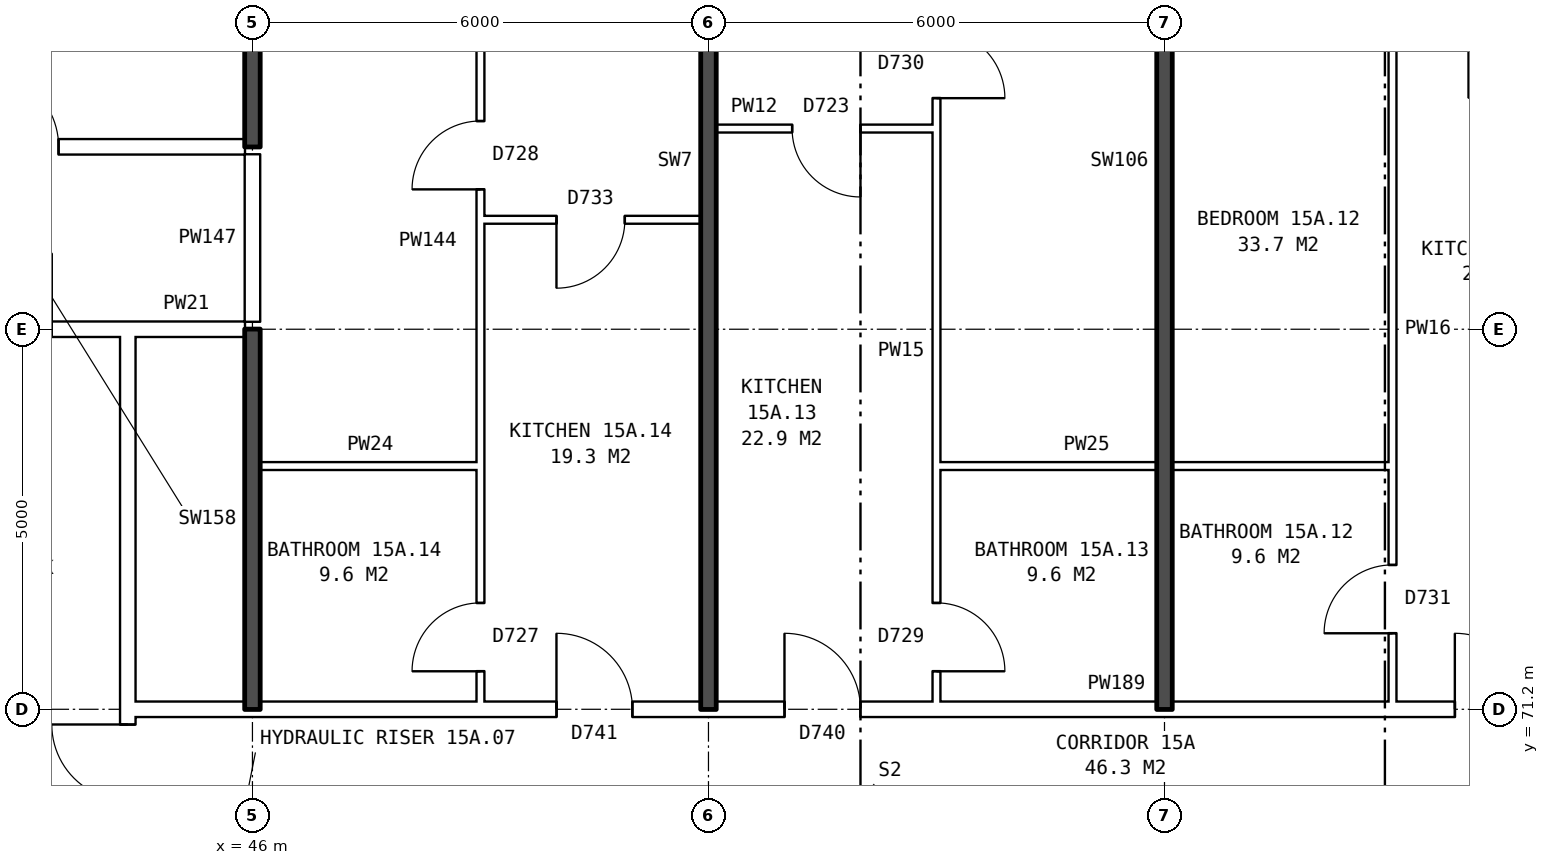
"""IFC4 building model, lengths in metres.
Left out: names, types, materials, properties, quantities, classifications, styles, units other than length and angle.
Written with IfcOpenShell. Run it as: python <this file> out.ifc"""

import sys

from ifc_helpers import new_model, si_unit, direction, frame, frame_2d, origin, place, context, subcontext, project, spatial, rectangle, extrude, element, fill, save


model = new_model("IFC4")
c1 = context("Model", 3, precision=1e-05, world=origin(), true_north=direction((0.0, 1.0)))
c2 = subcontext(c1, "Body", "Model", "MODEL_VIEW")
j1 = project(units=[si_unit("LENGTHUNIT", "METRE"), si_unit("PLANEANGLEUNIT", "RADIAN")], contexts=[c1])
p1 = place(None, origin())
s1 = spatial("IfcSite", under=j1, at=p1, CompositionType="ELEMENT")
p2 = place(p1, origin())
s2 = spatial("IfcBuilding", under=s1, at=p2, CompositionType="ELEMENT")
p3 = place(p2, frame((0.0, 0.0, 56.7)))
s3 = spatial("IfcBuildingStorey", under=s2, at=p3, CompositionType="ELEMENT", Elevation=56.7)
p4 = place(p3, frame((44.36, 63.9, 0.0), z_axis=(0.0, 0.0, 1.0), x_axis=(0.0, 1.0, 0.0)))
e1 = element("IfcWall", 1, at=p4, inside=s3, PredefinedType="PARTITIONING", context=c2, shape_type="SweptSolid", body=[
    extrude(rectangle(XDim=12.2, YDim=0.2, at=frame_2d((6.1, 0.0))), origin(), (0.0, 0.0, 1.0), 2.85),
])
p5 = place(p4, frame((5.1, 0.0, 0.0)))
e2 = element("IfcOpeningElement", 2, at=p5, cuts=e1, PredefinedType="OPENING", context=c2, shape_type="SweptSolid", body=[
    extrude(rectangle(XDim=2.0, YDim=2.1, at=frame_2d((1.0, 1.05))), frame((0.0, 0.11, 0.0), z_axis=(0.0, -1.0, 0.0), x_axis=(1.0, 0.0, 0.0)), (0.0, 0.0, 1.0), 0.22),
])
p6 = place(p3, frame((44.36, 71.2, 0.0), z_axis=(0.0, 0.0, 1.0), x_axis=(1.0, 0.0, 0.0)))
e3 = element("IfcWall", 3, at=p6, inside=s3, PredefinedType="PARTITIONING", context=c2, shape_type="SweptSolid", body=[
    extrude(rectangle(XDim=19.28, YDim=0.2, at=frame_2d((9.64, 0.0))), origin(), (0.0, 0.0, 1.0), 2.85),
])
p7 = place(p6, frame((17.46, 0.0, 0.0)))
e4 = element("IfcOpeningElement", 4, at=p7, cuts=e3, PredefinedType="OPENING", context=c2, shape_type="SweptSolid", body=[
    extrude(rectangle(XDim=1.0, YDim=2.1, at=frame_2d((0.5, 1.05))), frame((0.0, 0.11, 0.0), z_axis=(0.0, -1.0, 0.0), x_axis=(1.0, 0.0, 0.0)), (0.0, 0.0, 1.0), 0.22),
])
p8 = place(p6, frame((8.64, 0.0, 0.0)))
e5 = element("IfcOpeningElement", 5, at=p8, cuts=e3, PredefinedType="OPENING", context=c2, shape_type="SweptSolid", body=[
    extrude(rectangle(XDim=1.0, YDim=2.1, at=frame_2d((0.5, 1.05))), frame((0.0, 0.11, 0.0), z_axis=(0.0, -1.0, 0.0), x_axis=(1.0, 0.0, 0.0)), (0.0, 0.0, 1.0), 0.22),
])
p9 = place(p6, frame((5.64, 0.0, 0.0)))
e6 = element("IfcOpeningElement", 6, at=p9, cuts=e3, PredefinedType="OPENING", context=c2, shape_type="SweptSolid", body=[
    extrude(rectangle(XDim=1.0, YDim=2.1, at=frame_2d((0.5, 1.05))), frame((0.0, 0.11, 0.0), z_axis=(0.0, -1.0, 0.0), x_axis=(1.0, 0.0, 0.0)), (0.0, 0.0, 1.0), 0.22),
])
p10 = place(p3, frame((46.1, 74.4, 0.0), z_axis=(0.0, 0.0, 1.0), x_axis=(1.0, 0.0, 0.0)))
e7 = element("IfcWall", 7, at=p10, inside=s3, PredefinedType="PARTITIONING", context=c2, shape_type="SweptSolid", body=[
    extrude(rectangle(XDim=2.9, YDim=0.1, at=frame_2d((1.45, 0.0))), origin(), (0.0, 0.0, 1.0), 2.85),
])
p11 = place(p3, frame((55.0, 74.4, 0.0), z_axis=(0.0, 0.0, 1.0), x_axis=(1.0, 0.0, 0.0)))
e8 = element("IfcWall", 8, at=p11, inside=s3, PredefinedType="PARTITIONING", context=c2, shape_type="SweptSolid", body=[
    extrude(rectangle(XDim=6.0, YDim=0.1, at=frame_2d((3.0, 0.0))), origin(), (0.0, 0.0, 1.0), 2.85),
])
p12 = place(p3, frame((41.36, 76.2, 0.0), z_axis=(0.0, 0.0, 1.0), x_axis=(1.0, 0.0, 0.0)))
e9 = element("IfcWall", 9, at=p12, inside=s3, PredefinedType="PARTITIONING", context=c2, shape_type="SweptSolid", body=[
    extrude(rectangle(XDim=3.0, YDim=0.2, at=frame_2d((1.5, 0.0))), origin(), (0.0, 0.0, 1.0), 2.85),
])
p13 = place(p12, frame((1.0, 0.0, 0.0)))
e10 = element("IfcOpeningElement", 10, at=p13, cuts=e9, PredefinedType="OPENING", context=c2, shape_type="SweptSolid", body=[
    extrude(rectangle(XDim=1.0, YDim=2.1, at=frame_2d((0.5, 1.05))), frame((0.0, 0.11, 0.0), z_axis=(0.0, -1.0, 0.0), x_axis=(1.0, 0.0, 0.0)), (0.0, 0.0, 1.0), 0.22),
])
p14 = place(p3, frame((44.36, 76.2, 0.0), z_axis=(0.0, 0.0, 1.0), x_axis=(1.0, 0.0, 0.0)))
e11 = element("IfcWall", 11, at=p14, inside=s3, PredefinedType="PARTITIONING", context=c2, shape_type="SweptSolid", body=[
    extrude(rectangle(XDim=1.54, YDim=0.2, at=frame_2d((0.77, 0.0))), origin(), (0.0, 0.0, 1.0), 2.85),
])
p15 = place(p3, frame((49.0, 77.64, 0.0), z_axis=(0.0, 0.0, 1.0), x_axis=(1.0, 0.0, 0.0)))
e12 = element("IfcWall", 12, at=p15, inside=s3, PredefinedType="PARTITIONING", context=c2, shape_type="SweptSolid", body=[
    extrude(rectangle(XDim=2.9, YDim=0.1, at=frame_2d((1.45, 0.0))), origin(), (0.0, 0.0, 1.0), 2.85),
])
p16 = place(p15, frame((1.0, 0.0, 0.0)))
e13 = element("IfcOpeningElement", 13, at=p16, cuts=e12, PredefinedType="OPENING", context=c2, shape_type="SweptSolid", body=[
    extrude(rectangle(XDim=0.9, YDim=2.1, at=frame_2d((0.45, 1.05))), frame((0.0, 0.06, 0.0), z_axis=(0.0, -1.0, 0.0), x_axis=(1.0, 0.0, 0.0)), (0.0, 0.0, 1.0), 0.12),
])
p17 = place(p3, frame((21.86, 78.6, 0.0), z_axis=(0.0, 0.0, 1.0), x_axis=(1.0, 0.0, 0.0)))
e14 = element("IfcWall", 14, at=p17, inside=s3, PredefinedType="PARTITIONING", context=c2, shape_type="SweptSolid", body=[
    extrude(rectangle(XDim=24.04, YDim=0.2, at=frame_2d((12.02, 0.0))), origin(), (0.0, 0.0, 1.0), 2.85),
])
p18 = place(p17, frame((20.59, 0.0, 0.0)))
e15 = element("IfcOpeningElement", 15, at=p18, cuts=e14, PredefinedType="OPENING", context=c2, shape_type="SweptSolid", body=[
    extrude(rectangle(XDim=1.0, YDim=2.1, at=frame_2d((0.5, 1.05))), frame((0.0, 0.11, 0.0), z_axis=(0.0, -1.0, 0.0), x_axis=(1.0, 0.0, 0.0)), (0.0, 0.0, 1.0), 0.22),
])
p19 = place(p17, frame((8.64, 0.0, 0.0)))
e16 = element("IfcOpeningElement", 16, at=p19, cuts=e14, PredefinedType="OPENING", context=c2, shape_type="SweptSolid", body=[
    extrude(rectangle(XDim=1.0, YDim=2.1, at=frame_2d((0.5, 1.05))), frame((0.0, 0.11, 0.0), z_axis=(0.0, -1.0, 0.0), x_axis=(1.0, 0.0, 0.0)), (0.0, 0.0, 1.0), 0.22),
])
p20 = place(p17, frame((3.64, 0.0, 0.0)))
e17 = element("IfcOpeningElement", 17, at=p20, cuts=e14, PredefinedType="OPENING", context=c2, shape_type="SweptSolid", body=[
    extrude(rectangle(XDim=1.0, YDim=2.1, at=frame_2d((0.5, 1.05))), frame((0.0, 0.11, 0.0), z_axis=(0.0, -1.0, 0.0), x_axis=(1.0, 0.0, 0.0)), (0.0, 0.0, 1.0), 0.22),
])
p21 = place(p3, frame((52.1, 78.84, 0.0), z_axis=(0.0, 0.0, 1.0), x_axis=(1.0, 0.0, 0.0)))
e18 = element("IfcWall", 18, at=p21, inside=s3, PredefinedType="PARTITIONING", context=c2, shape_type="SweptSolid", body=[
    extrude(rectangle(XDim=2.9, YDim=0.1, at=frame_2d((1.45, 0.0))), origin(), (0.0, 0.0, 1.0), 2.85),
])
p22 = place(p21, frame((1.0, 0.0, 0.0)))
e19 = element("IfcOpeningElement", 19, at=p22, cuts=e18, PredefinedType="OPENING", context=c2, shape_type="SweptSolid", body=[
    extrude(rectangle(XDim=0.9, YDim=2.1, at=frame_2d((0.45, 1.05))), frame((0.0, 0.06, 0.0), z_axis=(0.0, -1.0, 0.0), x_axis=(1.0, 0.0, 0.0)), (0.0, 0.0, 1.0), 0.12),
])
p23 = place(p3, frame((46.0, 71.2, 0.0), z_axis=(0.0, 0.0, 1.0), x_axis=(0.0, 1.0, 0.0)))
e20 = element("IfcWall", 20, at=p23, inside=s3, PredefinedType="SOLIDWALL", context=c2, shape_type="SweptSolid", body=[
    extrude(rectangle(XDim=5.0, YDim=0.2, at=frame_2d((2.5, 0.0))), origin(), (0.0, 0.0, 1.0), 2.85),
])
p24 = place(p3, frame((46.0, 76.3, 0.0), z_axis=(0.0, 0.0, 1.0), x_axis=(0.0, 1.0, 0.0)))
e21 = element("IfcWall", 21, at=p24, inside=s3, PredefinedType="PARTITIONING", context=c2, shape_type="SweptSolid", body=[
    extrude(rectangle(XDim=2.2, YDim=0.2, at=frame_2d((1.1, 0.0))), origin(), (0.0, 0.0, 1.0), 2.85),
])
p25 = place(p3, frame((46.0, 78.6, 0.0), z_axis=(0.0, 0.0, 1.0), x_axis=(0.0, 1.0, 0.0)))
e22 = element("IfcWall", 22, at=p25, inside=s3, PredefinedType="SOLIDWALL", context=c2, shape_type="SweptSolid", body=[
    extrude(rectangle(XDim=7.04, YDim=0.2, at=frame_2d((3.52, 0.0))), origin(), (0.0, 0.0, 1.0), 2.85),
])
p26 = place(p3, frame((49.0, 71.3, 0.0), z_axis=(0.0, 0.0, 1.0), x_axis=(0.0, 1.0, 0.0)))
e23 = element("IfcWall", 23, at=p26, inside=s3, PredefinedType="PARTITIONING", context=c2, shape_type="SweptSolid", body=[
    extrude(rectangle(XDim=14.34, YDim=0.1, at=frame_2d((7.17, 0.0))), origin(), (0.0, 0.0, 1.0), 2.85),
])
p27 = place(p26, frame((6.74, 0.0, 0.0)))
e24 = element("IfcOpeningElement", 24, at=p27, cuts=e23, PredefinedType="OPENING", context=c2, shape_type="SweptSolid", body=[
    extrude(rectangle(XDim=0.9, YDim=2.1, at=frame_2d((0.45, 1.05))), frame((0.0, 0.06, 0.0), z_axis=(0.0, -1.0, 0.0), x_axis=(1.0, 0.0, 0.0)), (0.0, 0.0, 1.0), 0.12),
])
p28 = place(p26, frame((0.4, 0.0, 0.0)))
e25 = element("IfcOpeningElement", 25, at=p28, cuts=e23, PredefinedType="OPENING", context=c2, shape_type="SweptSolid", body=[
    extrude(rectangle(XDim=0.9, YDim=2.1, at=frame_2d((0.45, 1.05))), frame((0.0, 0.06, 0.0), z_axis=(0.0, -1.0, 0.0), x_axis=(1.0, 0.0, 0.0)), (0.0, 0.0, 1.0), 0.12),
])
p29 = place(p3, frame((52.0, 71.2, 0.0), z_axis=(0.0, 0.0, 1.0), x_axis=(0.0, 1.0, 0.0)))
e26 = element("IfcWall", 26, at=p29, inside=s3, PredefinedType="SOLIDWALL", context=c2, shape_type="SweptSolid", body=[
    extrude(rectangle(XDim=14.44, YDim=0.2, at=frame_2d((7.22, 0.0))), origin(), (0.0, 0.0, 1.0), 2.85),
])
p30 = place(p3, frame((55.0, 71.3, 0.0), z_axis=(0.0, 0.0, 1.0), x_axis=(0.0, 1.0, 0.0)))
e27 = element("IfcWall", 27, at=p30, inside=s3, PredefinedType="PARTITIONING", context=c2, shape_type="SweptSolid", body=[
    extrude(rectangle(XDim=14.34, YDim=0.1, at=frame_2d((7.17, 0.0))), origin(), (0.0, 0.0, 1.0), 2.85),
])
p31 = place(p30, frame((7.94, 0.0, 0.0)))
e28 = element("IfcOpeningElement", 28, at=p31, cuts=e27, PredefinedType="OPENING", context=c2, shape_type="SweptSolid", body=[
    extrude(rectangle(XDim=0.9, YDim=2.1, at=frame_2d((0.45, 1.05))), frame((0.0, 0.06, 0.0), z_axis=(0.0, -1.0, 0.0), x_axis=(1.0, 0.0, 0.0)), (0.0, 0.0, 1.0), 0.12),
])
p32 = place(p30, frame((0.4, 0.0, 0.0)))
e29 = element("IfcOpeningElement", 29, at=p32, cuts=e27, PredefinedType="OPENING", context=c2, shape_type="SweptSolid", body=[
    extrude(rectangle(XDim=0.9, YDim=2.1, at=frame_2d((0.45, 1.05))), frame((0.0, 0.06, 0.0), z_axis=(0.0, -1.0, 0.0), x_axis=(1.0, 0.0, 0.0)), (0.0, 0.0, 1.0), 0.12),
])
p33 = place(p3, frame((58.0, 71.2, 0.0), z_axis=(0.0, 0.0, 1.0), x_axis=(0.0, 1.0, 0.0)))
e30 = element("IfcWall", 30, at=p33, inside=s3, PredefinedType="SOLIDWALL", context=c2, shape_type="SweptSolid", body=[
    extrude(rectangle(XDim=14.44, YDim=0.2, at=frame_2d((7.22, 0.0))), origin(), (0.0, 0.0, 1.0), 2.85),
])
p34 = place(p3, frame((61.0, 71.3, 0.0), z_axis=(0.0, 0.0, 1.0), x_axis=(0.0, 1.0, 0.0)))
e31 = element("IfcWall", 31, at=p34, inside=s3, PredefinedType="PARTITIONING", context=c2, shape_type="SweptSolid", body=[
    extrude(rectangle(XDim=14.34, YDim=0.1, at=frame_2d((7.17, 0.0))), origin(), (0.0, 0.0, 1.0), 2.85),
])
p35 = place(p34, frame((9.24, 0.0, 0.0)))
e32 = element("IfcOpeningElement", 32, at=p35, cuts=e31, PredefinedType="OPENING", context=c2, shape_type="SweptSolid", body=[
    extrude(rectangle(XDim=0.9, YDim=2.1, at=frame_2d((0.45, 1.05))), frame((0.0, 0.06, 0.0), z_axis=(0.0, -1.0, 0.0), x_axis=(1.0, 0.0, 0.0)), (0.0, 0.0, 1.0), 0.12),
])
p36 = place(p34, frame((0.9, 0.0, 0.0)))
e33 = element("IfcOpeningElement", 33, at=p36, cuts=e31, PredefinedType="OPENING", context=c2, shape_type="SweptSolid", body=[
    extrude(rectangle(XDim=0.9, YDim=2.1, at=frame_2d((0.45, 1.05))), frame((0.0, 0.06, 0.0), z_axis=(0.0, -1.0, 0.0), x_axis=(1.0, 0.0, 0.0)), (0.0, 0.0, 1.0), 0.12),
])
p37 = place(p5, origin())
e34 = element("IfcDoor", 34, at=p37, inside=s3, OperationType="DOUBLE_DOOR_SINGLE_SWING", PredefinedType="DOOR", context=c2, shape_type="SweptSolid", body=[
    extrude(rectangle(XDim=2.0, YDim=2.1, at=frame_2d((1.0, 1.05))), frame((0.0, 0.025, 0.0), z_axis=(0.0, -1.0, 0.0), x_axis=(1.0, 0.0, 0.0)), (0.0, 0.0, 1.0), 0.05),
])
fill(e2, e34)
p38 = place(p7, origin())
e35 = element("IfcDoor", 35, at=p38, inside=s3, OperationType="SINGLE_SWING_LEFT", PredefinedType="DOOR", context=c2, shape_type="SweptSolid", body=[
    extrude(rectangle(XDim=1.0, YDim=2.1, at=frame_2d((0.5, 1.05))), frame((0.0, 0.025, 0.0), z_axis=(0.0, -1.0, 0.0), x_axis=(1.0, 0.0, 0.0)), (0.0, 0.0, 1.0), 0.05),
])
fill(e4, e35)
p39 = place(p36, origin())
e36 = element("IfcDoor", 36, at=p39, inside=s3, OperationType="SINGLE_SWING_LEFT", PredefinedType="DOOR", context=c2, shape_type="SweptSolid", body=[
    extrude(rectangle(XDim=0.9, YDim=2.1, at=frame_2d((0.45, 1.05))), frame((0.0, 0.025, 0.0), z_axis=(0.0, -1.0, 0.0), x_axis=(1.0, 0.0, 0.0)), (0.0, 0.0, 1.0), 0.05),
])
fill(e33, e36)
p40 = place(p31, frame((0.9, 0.0, 0.0), z_axis=(0.0, 0.0, 1.0), x_axis=(-1.0, 0.0, 0.0)))
e37 = element("IfcDoor", 37, at=p40, inside=s3, OperationType="SINGLE_SWING_RIGHT", PredefinedType="DOOR", context=c2, shape_type="SweptSolid", body=[
    extrude(rectangle(XDim=0.9, YDim=2.1, at=frame_2d((0.45, 1.05))), frame((0.0, 0.025, 0.0), z_axis=(0.0, -1.0, 0.0), x_axis=(1.0, 0.0, 0.0)), (0.0, 0.0, 1.0), 0.05),
])
fill(e28, e37)
p41 = place(p8, origin())
e38 = element("IfcDoor", 38, at=p41, inside=s3, OperationType="SINGLE_SWING_LEFT", PredefinedType="DOOR", context=c2, shape_type="SweptSolid", body=[
    extrude(rectangle(XDim=1.0, YDim=2.1, at=frame_2d((0.5, 1.05))), frame((0.0, 0.025, 0.0), z_axis=(0.0, -1.0, 0.0), x_axis=(1.0, 0.0, 0.0)), (0.0, 0.0, 1.0), 0.05),
])
fill(e5, e38)
p42 = place(p22, frame((0.9, 0.0, 0.0), z_axis=(0.0, 0.0, 1.0), x_axis=(-1.0, 0.0, 0.0)))
e39 = element("IfcDoor", 39, at=p42, inside=s3, OperationType="SINGLE_SWING_LEFT", PredefinedType="DOOR", context=c2, shape_type="SweptSolid", body=[
    extrude(rectangle(XDim=0.9, YDim=2.1, at=frame_2d((0.45, 1.05))), frame((0.0, 0.025, 0.0), z_axis=(0.0, -1.0, 0.0), x_axis=(1.0, 0.0, 0.0)), (0.0, 0.0, 1.0), 0.05),
])
fill(e19, e39)
p43 = place(p32, frame((0.9, 0.0, 0.0), z_axis=(0.0, 0.0, 1.0), x_axis=(-1.0, 0.0, 0.0)))
e40 = element("IfcDoor", 40, at=p43, inside=s3, OperationType="SINGLE_SWING_RIGHT", PredefinedType="DOOR", context=c2, shape_type="SweptSolid", body=[
    extrude(rectangle(XDim=0.9, YDim=2.1, at=frame_2d((0.45, 1.05))), frame((0.0, 0.025, 0.0), z_axis=(0.0, -1.0, 0.0), x_axis=(1.0, 0.0, 0.0)), (0.0, 0.0, 1.0), 0.05),
])
fill(e29, e40)
p44 = place(p27, origin())
e41 = element("IfcDoor", 41, at=p44, inside=s3, OperationType="SINGLE_SWING_LEFT", PredefinedType="DOOR", context=c2, shape_type="SweptSolid", body=[
    extrude(rectangle(XDim=0.9, YDim=2.1, at=frame_2d((0.45, 1.05))), frame((0.0, 0.025, 0.0), z_axis=(0.0, -1.0, 0.0), x_axis=(1.0, 0.0, 0.0)), (0.0, 0.0, 1.0), 0.05),
])
fill(e24, e41)
p45 = place(p9, origin())
e42 = element("IfcDoor", 42, at=p45, inside=s3, OperationType="SINGLE_SWING_LEFT", PredefinedType="DOOR", context=c2, shape_type="SweptSolid", body=[
    extrude(rectangle(XDim=1.0, YDim=2.1, at=frame_2d((0.5, 1.05))), frame((0.0, 0.025, 0.0), z_axis=(0.0, -1.0, 0.0), x_axis=(1.0, 0.0, 0.0)), (0.0, 0.0, 1.0), 0.05),
])
fill(e6, e42)
p46 = place(p16, frame((0.9, 0.0, 0.0), z_axis=(0.0, 0.0, 1.0), x_axis=(-1.0, 0.0, 0.0)))
e43 = element("IfcDoor", 43, at=p46, inside=s3, OperationType="SINGLE_SWING_RIGHT", PredefinedType="DOOR", context=c2, shape_type="SweptSolid", body=[
    extrude(rectangle(XDim=0.9, YDim=2.1, at=frame_2d((0.45, 1.05))), frame((0.0, 0.025, 0.0), z_axis=(0.0, -1.0, 0.0), x_axis=(1.0, 0.0, 0.0)), (0.0, 0.0, 1.0), 0.05),
])
fill(e13, e43)
p47 = place(p28, origin())
e44 = element("IfcDoor", 44, at=p47, inside=s3, OperationType="SINGLE_SWING_LEFT", PredefinedType="DOOR", context=c2, shape_type="SweptSolid", body=[
    extrude(rectangle(XDim=0.9, YDim=2.1, at=frame_2d((0.45, 1.05))), frame((0.0, 0.025, 0.0), z_axis=(0.0, -1.0, 0.0), x_axis=(1.0, 0.0, 0.0)), (0.0, 0.0, 1.0), 0.05),
])
fill(e25, e44)
p48 = place(p18, origin())
e45 = element("IfcDoor", 45, at=p48, inside=s3, OperationType="SINGLE_SWING_LEFT", PredefinedType="DOOR", context=c2, shape_type="SweptSolid", body=[
    extrude(rectangle(XDim=1.0, YDim=2.1, at=frame_2d((0.5, 1.05))), frame((0.0, 0.025, 0.0), z_axis=(0.0, -1.0, 0.0), x_axis=(1.0, 0.0, 0.0)), (0.0, 0.0, 1.0), 0.05),
])
fill(e15, e45)
save(model, sys.argv[1])
